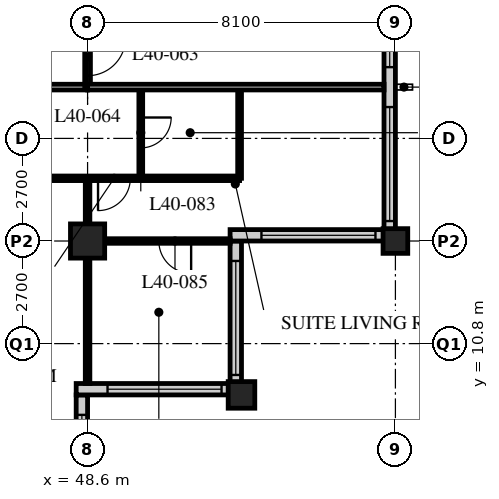
"""IFC4 building model, lengths in metres.
Left out: names, types, materials, properties, quantities, classifications, styles, units other than length and angle.
Written with IfcOpenShell. Run it as: python <this file> out.ifc"""

import sys

from ifc_helpers import new_model, si_unit, direction, frame, frame_2d, origin, origin_2d, place, context, subcontext, project, spatial, rectangle, hollow_rectangle, extrude, element, fill, save


model = new_model("IFC4")
c1 = context("Model", 3, precision=1e-05, world=origin(), true_north=direction((0.0, 1.0)))
c2 = subcontext(c1, "Body", "Model", "MODEL_VIEW")
j1 = project(units=[si_unit("LENGTHUNIT", "METRE"), si_unit("PLANEANGLEUNIT", "RADIAN")], contexts=[c1])
p1 = place(None, origin())
s1 = spatial("IfcSite", under=j1, at=p1, CompositionType="ELEMENT")
p2 = place(p1, origin())
s2 = spatial("IfcBuilding", under=s1, at=p2, CompositionType="ELEMENT")
p3 = place(p2, frame((0.0, 0.0, 154.4)))
s3 = spatial("IfcBuildingStorey", under=s2, at=p3, CompositionType="ELEMENT", Elevation=154.4)
p4 = place(p3, frame((48.6, 13.5, 0.0), z_axis=(0.0, 0.0, 1.0), x_axis=(1.0, 0.0, 0.0)))
e1 = element("IfcColumn", 1, at=p4, inside=s3, PredefinedType="COLUMN", context=c2, shape_type="SweptSolid", body=[
    extrude(hollow_rectangle(XDim=0.9, YDim=0.9, WallThickness=0.1, at=origin_2d()), origin(), (0.0, 0.0, 1.0), 3.4),
])
p5 = place(p3, frame((52.65, 9.45, 0.0), z_axis=(0.0, 0.0, 1.0), x_axis=(1.0, 0.0, 0.0)))
e2 = element("IfcColumn", 2, at=p5, inside=s3, PredefinedType="COLUMN", context=c2, shape_type="SweptSolid", body=[
    extrude(hollow_rectangle(XDim=0.7, YDim=0.7, WallThickness=0.07, at=origin_2d()), origin(), (0.0, 0.0, 1.0), 3.4),
])
p6 = place(p3, frame((56.7, 13.5, 0.0), z_axis=(0.0, 0.0, 1.0), x_axis=(1.0, 0.0, 0.0)))
e3 = element("IfcColumn", 3, at=p6, inside=s3, PredefinedType="COLUMN", context=c2, shape_type="SweptSolid", body=[
    extrude(hollow_rectangle(XDim=0.65, YDim=0.65, WallThickness=0.055, at=origin_2d()), origin(), (0.0, 0.0, 1.0), 3.4),
])
p7 = place(p3, frame((48.45, 5.7, 0.0), z_axis=(0.0, 0.0, 1.0), x_axis=(0.0, 1.0, 0.0)))
e4 = element("IfcWall", 4, at=p7, inside=s3, PredefinedType="SOLIDWALL", context=c2, shape_type="SweptSolid", body=[
    extrude(rectangle(XDim=3.75, YDim=0.3, at=frame_2d((1.875, 0.0))), origin(), (0.0, 0.0, 1.0), 2.15),
])
p8 = place(p7, frame((0.225, 0.0, 0.9)))
e5 = element("IfcOpeningElement", 5, at=p8, cuts=e4, PredefinedType="OPENING", context=c2, shape_type="SweptSolid", body=[
    extrude(rectangle(XDim=3.0, YDim=1.2, at=frame_2d((1.5, 0.6))), frame((0.0, 0.16, 0.0), z_axis=(0.0, -1.0, 0.0), x_axis=(1.0, 0.0, 0.0)), (0.0, 0.0, 1.0), 0.32),
])
p9 = place(p3, frame((48.3, 9.6, 0.0), z_axis=(0.0, 0.0, 1.0), x_axis=(1.0, 0.0, 0.0)))
e6 = element("IfcWall", 6, at=p9, inside=s3, PredefinedType="SOLIDWALL", context=c2, shape_type="SweptSolid", body=[
    extrude(rectangle(XDim=4.35, YDim=0.3, at=frame_2d((2.175, 0.0))), origin(), (0.0, 0.0, 1.0), 2.45),
])
p10 = place(p9, frame((0.825, 0.0, 0.9)))
e7 = element("IfcOpeningElement", 7, at=p10, cuts=e6, PredefinedType="OPENING", context=c2, shape_type="SweptSolid", body=[
    extrude(rectangle(XDim=3.0, YDim=1.2, at=frame_2d((1.5, 0.6))), frame((0.0, 0.16, 0.0), z_axis=(0.0, -1.0, 0.0), x_axis=(1.0, 0.0, 0.0)), (0.0, 0.0, 1.0), 0.32),
])
p11 = place(p3, frame((52.5, 9.75, 0.0), z_axis=(0.0, 0.0, 1.0), x_axis=(0.0, 1.0, 0.0)))
e8 = element("IfcWall", 8, at=p11, inside=s3, PredefinedType="SOLIDWALL", context=c2, shape_type="SweptSolid", body=[
    extrude(rectangle(XDim=3.75, YDim=0.3, at=frame_2d((1.875, 0.0))), origin(), (0.0, 0.0, 1.0), 2.45),
])
p12 = place(p11, frame((0.225, 0.0, 0.9)))
e9 = element("IfcOpeningElement", 9, at=p12, cuts=e8, PredefinedType="OPENING", context=c2, shape_type="SweptSolid", body=[
    extrude(rectangle(XDim=3.0, YDim=1.2, at=frame_2d((1.5, 0.6))), frame((0.0, 0.16, 0.0), z_axis=(0.0, -1.0, 0.0), x_axis=(1.0, 0.0, 0.0)), (0.0, 0.0, 1.0), 0.32),
])
p13 = place(p3, frame((52.35, 13.65, 0.0), z_axis=(0.0, 0.0, 1.0), x_axis=(1.0, 0.0, 0.0)))
e10 = element("IfcWall", 10, at=p13, inside=s3, PredefinedType="SOLIDWALL", context=c2, shape_type="SweptSolid", body=[
    extrude(rectangle(XDim=4.35, YDim=0.3, at=frame_2d((2.175, 0.0))), origin(), (0.0, 0.0, 1.0), 3.15),
])
p14 = place(p13, frame((0.825, 0.0, 0.9)))
e11 = element("IfcOpeningElement", 11, at=p14, cuts=e10, PredefinedType="OPENING", context=c2, shape_type="SweptSolid", body=[
    extrude(rectangle(XDim=3.0, YDim=1.2, at=frame_2d((1.5, 0.6))), frame((0.0, 0.16, 0.0), z_axis=(0.0, -1.0, 0.0), x_axis=(1.0, 0.0, 0.0)), (0.0, 0.0, 1.0), 0.32),
])
p15 = place(p3, frame((56.55, 13.8, 0.0), z_axis=(0.0, 0.0, 1.0), x_axis=(0.0, 1.0, 0.0)))
e12 = element("IfcWall", 12, at=p15, inside=s3, PredefinedType="SOLIDWALL", context=c2, shape_type="SweptSolid", body=[
    extrude(rectangle(XDim=32.1, YDim=0.3, at=frame_2d((16.05, 0.0))), origin(), (0.0, 0.0, 1.0), 2.15),
])
p16 = place(p15, frame((0.225, 0.0, 0.9)))
e13 = element("IfcOpeningElement", 13, at=p16, cuts=e12, PredefinedType="OPENING", context=c2, shape_type="SweptSolid", body=[
    extrude(rectangle(XDim=3.0, YDim=1.2, at=frame_2d((1.5, 0.6))), frame((0.0, 0.16, 0.0), z_axis=(0.0, -1.0, 0.0), x_axis=(1.0, 0.0, 0.0)), (0.0, 0.0, 1.0), 0.32),
])
p17 = place(p15, frame((4.275, 0.0, 0.9)))
e14 = element("IfcOpeningElement", 14, at=p17, cuts=e12, PredefinedType="OPENING", context=c2, shape_type="SweptSolid", body=[
    extrude(rectangle(XDim=3.0, YDim=1.2, at=frame_2d((1.5, 0.6))), frame((0.0, 0.16, 0.0), z_axis=(0.0, -1.0, 0.0), x_axis=(1.0, 0.0, 0.0)), (0.0, 0.0, 1.0), 0.32),
])
p18 = place(p15, frame((8.325, 0.0, 0.9)))
e15 = element("IfcOpeningElement", 15, at=p18, cuts=e12, PredefinedType="OPENING", context=c2, shape_type="SweptSolid", body=[
    extrude(rectangle(XDim=3.0, YDim=1.2, at=frame_2d((1.5, 0.6))), frame((0.0, 0.16, 0.0), z_axis=(0.0, -1.0, 0.0), x_axis=(1.0, 0.0, 0.0)), (0.0, 0.0, 1.0), 0.32),
])
p19 = place(p15, frame((12.375, 0.0, 0.9)))
e16 = element("IfcOpeningElement", 16, at=p19, cuts=e12, PredefinedType="OPENING", context=c2, shape_type="SweptSolid", body=[
    extrude(rectangle(XDim=3.0, YDim=1.2, at=frame_2d((1.5, 0.6))), frame((0.0, 0.16, 0.0), z_axis=(0.0, -1.0, 0.0), x_axis=(1.0, 0.0, 0.0)), (0.0, 0.0, 1.0), 0.32),
])
p20 = place(p15, frame((16.425, 0.0, 0.9)))
e17 = element("IfcOpeningElement", 17, at=p20, cuts=e12, PredefinedType="OPENING", context=c2, shape_type="SweptSolid", body=[
    extrude(rectangle(XDim=3.0, YDim=1.2, at=frame_2d((1.5, 0.6))), frame((0.0, 0.16, 0.0), z_axis=(0.0, -1.0, 0.0), x_axis=(1.0, 0.0, 0.0)), (0.0, 0.0, 1.0), 0.32),
])
p21 = place(p15, frame((20.475, 0.0, 0.9)))
e18 = element("IfcOpeningElement", 18, at=p21, cuts=e12, PredefinedType="OPENING", context=c2, shape_type="SweptSolid", body=[
    extrude(rectangle(XDim=3.0, YDim=1.2, at=frame_2d((1.5, 0.6))), frame((0.0, 0.16, 0.0), z_axis=(0.0, -1.0, 0.0), x_axis=(1.0, 0.0, 0.0)), (0.0, 0.0, 1.0), 0.32),
])
p22 = place(p15, frame((24.525, 0.0, 0.9)))
e19 = element("IfcOpeningElement", 19, at=p22, cuts=e12, PredefinedType="OPENING", context=c2, shape_type="SweptSolid", body=[
    extrude(rectangle(XDim=3.0, YDim=1.2, at=frame_2d((1.5, 0.6))), frame((0.0, 0.16, 0.0), z_axis=(0.0, -1.0, 0.0), x_axis=(1.0, 0.0, 0.0)), (0.0, 0.0, 1.0), 0.32),
])
p23 = place(p15, frame((28.575, 0.0, 0.9)))
e20 = element("IfcOpeningElement", 20, at=p23, cuts=e12, PredefinedType="OPENING", context=c2, shape_type="SweptSolid", body=[
    extrude(rectangle(XDim=3.0, YDim=1.2, at=frame_2d((1.5, 0.6))), frame((0.0, 0.16, 0.0), z_axis=(0.0, -1.0, 0.0), x_axis=(1.0, 0.0, 0.0)), (0.0, 0.0, 1.0), 0.32),
])
p24 = place(p3, frame((8.1, 17.55, 0.0), z_axis=(0.0, 0.0, 1.0), x_axis=(1.0, 0.0, 0.0)))
e21 = element("IfcWall", 21, at=p24, inside=s3, PredefinedType="PARTITIONING", context=c2, shape_type="SweptSolid", body=[
    extrude(rectangle(XDim=40.5, YDim=0.15, at=frame_2d((20.25, 0.0))), origin(), (0.0, 0.0, 1.0), 3.15),
])
p25 = place(p24, frame((10.0, 0.0, 0.0)))
e22 = element("IfcOpeningElement", 22, at=p25, cuts=e21, PredefinedType="OPENING", context=c2, shape_type="SweptSolid", body=[
    extrude(rectangle(XDim=1.0, YDim=2.1, at=frame_2d((0.5, 1.05))), frame((0.0, 0.085, 0.0), z_axis=(0.0, -1.0, 0.0), x_axis=(1.0, 0.0, 0.0)), (0.0, 0.0, 1.0), 0.17),
])
p26 = place(p24, frame((22.15, 0.0, 0.0)))
e23 = element("IfcOpeningElement", 23, at=p26, cuts=e21, PredefinedType="OPENING", context=c2, shape_type="SweptSolid", body=[
    extrude(rectangle(XDim=1.0, YDim=2.1, at=frame_2d((0.5, 1.05))), frame((0.0, 0.085, 0.0), z_axis=(0.0, -1.0, 0.0), x_axis=(1.0, 0.0, 0.0)), (0.0, 0.0, 1.0), 0.17),
])
p27 = place(p24, frame((30.8, 0.0, 0.0)))
e24 = element("IfcOpeningElement", 24, at=p27, cuts=e21, PredefinedType="OPENING", context=c2, shape_type="SweptSolid", body=[
    extrude(rectangle(XDim=1.0, YDim=2.1, at=frame_2d((0.5, 1.05))), frame((0.0, 0.085, 0.0), z_axis=(0.0, -1.0, 0.0), x_axis=(1.0, 0.0, 0.0)), (0.0, 0.0, 1.0), 0.17),
])
p28 = place(p24, frame((34.85, 0.0, 0.0)))
e25 = element("IfcOpeningElement", 25, at=p28, cuts=e21, PredefinedType="OPENING", context=c2, shape_type="SweptSolid", body=[
    extrude(rectangle(XDim=1.0, YDim=2.1, at=frame_2d((0.5, 1.05))), frame((0.0, 0.085, 0.0), z_axis=(0.0, -1.0, 0.0), x_axis=(1.0, 0.0, 0.0)), (0.0, 0.0, 1.0), 0.17),
])
p29 = place(p24, frame((1.525, 0.0, 0.0)))
e26 = element("IfcOpeningElement", 26, at=p29, cuts=e21, PredefinedType="OPENING", context=c2, shape_type="SweptSolid", body=[
    extrude(rectangle(XDim=1.0, YDim=2.1, at=frame_2d((0.5, 1.05))), frame((0.0, 0.085, 0.0), z_axis=(0.0, -1.0, 0.0), x_axis=(1.0, 0.0, 0.0)), (0.0, 0.0, 1.0), 0.17),
])
p30 = place(p24, frame((37.975, 0.0, 0.0)))
e27 = element("IfcOpeningElement", 27, at=p30, cuts=e21, PredefinedType="OPENING", context=c2, shape_type="SweptSolid", body=[
    extrude(rectangle(XDim=1.0, YDim=2.1, at=frame_2d((0.5, 1.05))), frame((0.0, 0.085, 0.0), z_axis=(0.0, -1.0, 0.0), x_axis=(1.0, 0.0, 0.0)), (0.0, 0.0, 1.0), 0.17),
])
p31 = place(p3, frame((48.6, 17.55, 0.0), z_axis=(0.0, 0.0, 1.0), x_axis=(0.0, 1.0, 0.0)))
e28 = element("IfcWall", 28, at=p31, inside=s3, PredefinedType="PARTITIONING", context=c2, shape_type="SweptSolid", body=[
    extrude(rectangle(XDim=28.35, YDim=0.15, at=frame_2d((14.175, 0.0))), origin(), (0.0, 0.0, 1.0), 2.15),
])
p32 = place(p31, frame((0.3, 0.0, 0.0)))
e29 = element("IfcOpeningElement", 29, at=p32, cuts=e28, PredefinedType="OPENING", context=c2, shape_type="SweptSolid", body=[
    extrude(rectangle(XDim=1.0, YDim=2.1, at=frame_2d((0.5, 1.05))), frame((0.0, 0.085, 0.0), z_axis=(0.0, -1.0, 0.0), x_axis=(1.0, 0.0, 0.0)), (0.0, 0.0, 1.0), 0.17),
])
p33 = place(p31, frame((6.5, 0.0, 0.0)))
e30 = element("IfcOpeningElement", 30, at=p33, cuts=e28, PredefinedType="OPENING", context=c2, shape_type="SweptSolid", body=[
    extrude(rectangle(XDim=1.0, YDim=2.1, at=frame_2d((0.5, 1.05))), frame((0.0, 0.085, 0.0), z_axis=(0.0, -1.0, 0.0), x_axis=(1.0, 0.0, 0.0)), (0.0, 0.0, 1.0), 0.17),
])
p34 = place(p31, frame((13.675, 0.0, 0.0)))
e31 = element("IfcOpeningElement", 31, at=p34, cuts=e28, PredefinedType="OPENING", context=c2, shape_type="SweptSolid", body=[
    extrude(rectangle(XDim=1.0, YDim=2.1, at=frame_2d((0.5, 1.05))), frame((0.0, 0.085, 0.0), z_axis=(0.0, -1.0, 0.0), x_axis=(1.0, 0.0, 0.0)), (0.0, 0.0, 1.0), 0.17),
])
p35 = place(p31, frame((22.7, 0.0, 0.0)))
e32 = element("IfcOpeningElement", 32, at=p35, cuts=e28, PredefinedType="OPENING", context=c2, shape_type="SweptSolid", body=[
    extrude(rectangle(XDim=1.0, YDim=2.1, at=frame_2d((0.5, 1.05))), frame((0.0, 0.085, 0.0), z_axis=(0.0, -1.0, 0.0), x_axis=(1.0, 0.0, 0.0)), (0.0, 0.0, 1.0), 0.17),
])
p36 = place(p31, frame((24.9, 0.0, 0.0)))
e33 = element("IfcOpeningElement", 33, at=p36, cuts=e28, PredefinedType="OPENING", context=c2, shape_type="SweptSolid", body=[
    extrude(rectangle(XDim=1.0, YDim=2.1, at=frame_2d((0.5, 1.05))), frame((0.0, 0.085, 0.0), z_axis=(0.0, -1.0, 0.0), x_axis=(1.0, 0.0, 0.0)), (0.0, 0.0, 1.0), 0.17),
])
p37 = place(p3, frame((44.55, 15.15, 0.0), z_axis=(0.0, 0.0, 1.0), x_axis=(1.0, 0.0, 0.0)))
e34 = element("IfcWall", 34, at=p37, inside=s3, PredefinedType="PARTITIONING", context=c2, shape_type="SweptSolid", body=[
    extrude(rectangle(XDim=8.05, YDim=0.12, at=frame_2d((4.025, 0.0))), origin(), (0.0, 0.0, 1.0), 3.15),
])
p38 = place(p37, frame((0.475, 0.0, 0.0)))
e35 = element("IfcOpeningElement", 35, at=p38, cuts=e34, PredefinedType="OPENING", context=c2, shape_type="SweptSolid", body=[
    extrude(rectangle(XDim=0.85, YDim=2.1, at=frame_2d((0.425, 1.05))), frame((0.0, 0.07, 0.0), z_axis=(0.0, -1.0, 0.0), x_axis=(1.0, 0.0, 0.0)), (0.0, 0.0, 1.0), 0.14),
])
p39 = place(p37, frame((4.325, 0.0, 0.0)))
e36 = element("IfcOpeningElement", 36, at=p39, cuts=e34, PredefinedType="OPENING", context=c2, shape_type="SweptSolid", body=[
    extrude(rectangle(XDim=0.85, YDim=2.1, at=frame_2d((0.425, 1.05))), frame((0.0, 0.07, 0.0), z_axis=(0.0, -1.0, 0.0), x_axis=(1.0, 0.0, 0.0)), (0.0, 0.0, 1.0), 0.14),
])
p40 = place(p3, frame((50.0, 17.55, 0.0), z_axis=(0.0, 0.0, 1.0), x_axis=(0.0, -1.0, 0.0)))
e37 = element("IfcWall", 37, at=p40, inside=s3, PredefinedType="PARTITIONING", context=c2, shape_type="SweptSolid", body=[
    extrude(rectangle(XDim=2.4, YDim=0.1, at=frame_2d((1.2, 0.0))), origin(), (0.0, 0.0, 1.0), 3.15),
])
p41 = place(p40, frame((0.8, 0.0, 0.0)))
e38 = element("IfcOpeningElement", 38, at=p41, cuts=e37, PredefinedType="OPENING", context=c2, shape_type="SweptSolid", body=[
    extrude(rectangle(XDim=0.8, YDim=2.1, at=frame_2d((0.4, 1.05))), frame((0.0, 0.06, 0.0), z_axis=(0.0, -1.0, 0.0), x_axis=(1.0, 0.0, 0.0)), (0.0, 0.0, 1.0), 0.12),
])
p42 = place(p3, frame((52.6, 17.55, 0.0), z_axis=(0.0, 0.0, 1.0), x_axis=(0.0, -1.0, 0.0)))
e39 = element("IfcWall", 39, at=p42, inside=s3, PredefinedType="PARTITIONING", context=c2, shape_type="SweptSolid", body=[
    extrude(rectangle(XDim=2.4, YDim=0.1, at=frame_2d((1.2, 0.0))), origin(), (0.0, 0.0, 1.0), 3.15),
])
p43 = place(p3, frame((48.6, 15.15, 0.0), z_axis=(0.0, 0.0, 1.0), x_axis=(0.0, -1.0, 0.0)))
e40 = element("IfcWall", 40, at=p43, inside=s3, PredefinedType="PARTITIONING", context=c2, shape_type="SweptSolid", body=[
    extrude(rectangle(XDim=5.4, YDim=0.12, at=frame_2d((2.7, 0.0))), origin(), (0.0, 0.0, 1.0), 2.15),
])
p44 = place(p3, frame((48.6, 13.5, 0.0), z_axis=(0.0, 0.0, 1.0), x_axis=(1.0, 0.0, 0.0)))
e41 = element("IfcWall", 41, at=p44, inside=s3, PredefinedType="PARTITIONING", context=c2, shape_type="SweptSolid", body=[
    extrude(rectangle(XDim=3.75, YDim=0.12, at=frame_2d((1.875, 0.0))), origin(), (0.0, 0.0, 1.0), 2.38),
])
p45 = place(p44, frame((1.875, 0.0, 0.0)))
e42 = element("IfcOpeningElement", 42, at=p45, cuts=e41, PredefinedType="OPENING", context=c2, shape_type="SweptSolid", body=[
    extrude(rectangle(XDim=0.85, YDim=2.1, at=frame_2d((0.425, 1.05))), frame((0.0, 0.07, 0.0), z_axis=(0.0, -1.0, 0.0), x_axis=(1.0, 0.0, 0.0)), (0.0, 0.0, 1.0), 0.14),
])
p46 = place(p3, frame((48.6, 17.55, 0.0), z_axis=(0.0, 0.0, 1.0), x_axis=(1.0, 0.0, 0.0)))
e43 = element("IfcWall", 43, at=p46, inside=s3, PredefinedType="PARTITIONING", context=c2, shape_type="SweptSolid", body=[
    extrude(rectangle(XDim=7.8, YDim=0.15, at=frame_2d((3.9, 0.0))), origin(), (0.0, 0.0, 1.0), 3.15),
])
p47 = place(p8, origin())
e44 = element("IfcWindow", 44, at=p47, inside=s3, PartitioningType="SINGLE_PANEL", PredefinedType="WINDOW", context=c2, shape_type="SweptSolid", body=[
    extrude(rectangle(XDim=3.0, YDim=1.2, at=frame_2d((1.5, 0.6))), frame((0.0, 0.03, 0.0), z_axis=(0.0, -1.0, 0.0), x_axis=(1.0, 0.0, 0.0)), (0.0, 0.0, 1.0), 0.06),
])
fill(e5, e44)
p48 = place(p10, origin())
e45 = element("IfcWindow", 45, at=p48, inside=s3, PartitioningType="SINGLE_PANEL", PredefinedType="WINDOW", context=c2, shape_type="SweptSolid", body=[
    extrude(rectangle(XDim=3.0, YDim=1.2, at=frame_2d((1.5, 0.6))), frame((0.0, 0.03, 0.0), z_axis=(0.0, -1.0, 0.0), x_axis=(1.0, 0.0, 0.0)), (0.0, 0.0, 1.0), 0.06),
])
fill(e7, e45)
p49 = place(p12, origin())
e46 = element("IfcWindow", 46, at=p49, inside=s3, PartitioningType="SINGLE_PANEL", PredefinedType="WINDOW", context=c2, shape_type="SweptSolid", body=[
    extrude(rectangle(XDim=3.0, YDim=1.2, at=frame_2d((1.5, 0.6))), frame((0.0, 0.03, 0.0), z_axis=(0.0, -1.0, 0.0), x_axis=(1.0, 0.0, 0.0)), (0.0, 0.0, 1.0), 0.06),
])
fill(e9, e46)
p50 = place(p14, origin())
e47 = element("IfcWindow", 47, at=p50, inside=s3, PartitioningType="SINGLE_PANEL", PredefinedType="WINDOW", context=c2, shape_type="SweptSolid", body=[
    extrude(rectangle(XDim=3.0, YDim=1.2, at=frame_2d((1.5, 0.6))), frame((0.0, 0.03, 0.0), z_axis=(0.0, -1.0, 0.0), x_axis=(1.0, 0.0, 0.0)), (0.0, 0.0, 1.0), 0.06),
])
fill(e11, e47)
p51 = place(p16, origin())
e48 = element("IfcWindow", 48, at=p51, inside=s3, PartitioningType="SINGLE_PANEL", PredefinedType="WINDOW", context=c2, shape_type="SweptSolid", body=[
    extrude(rectangle(XDim=3.0, YDim=1.2, at=frame_2d((1.5, 0.6))), frame((0.0, 0.03, 0.0), z_axis=(0.0, -1.0, 0.0), x_axis=(1.0, 0.0, 0.0)), (0.0, 0.0, 1.0), 0.06),
])
fill(e13, e48)
p52 = place(p17, origin())
e49 = element("IfcWindow", 49, at=p52, inside=s3, PartitioningType="SINGLE_PANEL", PredefinedType="WINDOW", context=c2, shape_type="SweptSolid", body=[
    extrude(rectangle(XDim=3.0, YDim=1.2, at=frame_2d((1.5, 0.6))), frame((0.0, 0.03, 0.0), z_axis=(0.0, -1.0, 0.0), x_axis=(1.0, 0.0, 0.0)), (0.0, 0.0, 1.0), 0.06),
])
fill(e14, e49)
p53 = place(p32, origin())
e50 = element("IfcDoor", 50, at=p53, inside=s3, OperationType="SINGLE_SWING_LEFT", PredefinedType="DOOR", context=c2, shape_type="SweptSolid", body=[
    extrude(rectangle(XDim=1.0, YDim=2.1, at=frame_2d((0.5, 1.05))), frame((0.0, 0.025, 0.0), z_axis=(0.0, -1.0, 0.0), x_axis=(1.0, 0.0, 0.0)), (0.0, 0.0, 1.0), 0.05),
])
fill(e29, e50)
p54 = place(p41, origin())
e51 = element("IfcDoor", 51, at=p54, inside=s3, OperationType="SINGLE_SWING_LEFT", PredefinedType="DOOR", context=c2, shape_type="SweptSolid", body=[
    extrude(rectangle(XDim=0.8, YDim=2.1, at=frame_2d((0.4, 1.05))), frame((0.0, 0.025, 0.0), z_axis=(0.0, -1.0, 0.0), x_axis=(1.0, 0.0, 0.0)), (0.0, 0.0, 1.0), 0.05),
])
fill(e38, e51)
p55 = place(p39, origin())
e52 = element("IfcDoor", 52, at=p55, inside=s3, OperationType="SINGLE_SWING_RIGHT", PredefinedType="DOOR", context=c2, shape_type="SweptSolid", body=[
    extrude(rectangle(XDim=0.85, YDim=2.1, at=frame_2d((0.425, 1.05))), frame((0.0, 0.025, 0.0), z_axis=(0.0, -1.0, 0.0), x_axis=(1.0, 0.0, 0.0)), (0.0, 0.0, 1.0), 0.05),
])
fill(e36, e52)
p56 = place(p45, origin())
e53 = element("IfcDoor", 53, at=p56, inside=s3, OperationType="SINGLE_SWING_LEFT", PredefinedType="DOOR", context=c2, shape_type="SweptSolid", body=[
    extrude(rectangle(XDim=0.85, YDim=2.1, at=frame_2d((0.425, 1.05))), frame((0.0, 0.025, 0.0), z_axis=(0.0, -1.0, 0.0), x_axis=(1.0, 0.0, 0.0)), (0.0, 0.0, 1.0), 0.05),
])
fill(e42, e53)
save(model, sys.argv[1])
